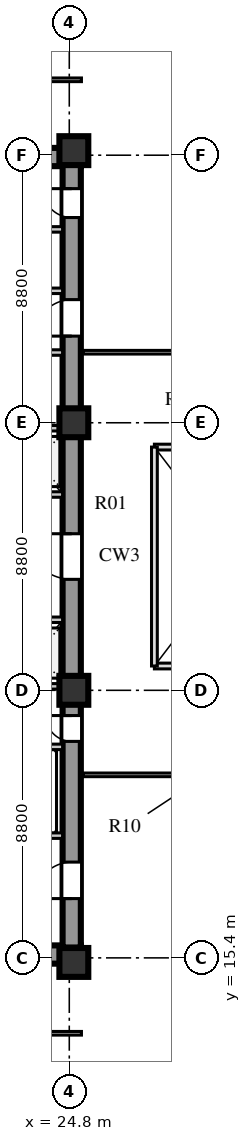
"""IFC4 building model, lengths in metres.
Left out: names, types, materials, properties, quantities, classifications, styles, units other than length and angle.
Written with IfcOpenShell. Run it as: python <this file> out.ifc"""

import sys

from ifc_helpers import new_model, si_unit, direction, frame, frame_2d, origin, origin_2d, place, context, subcontext, project, spatial, rectangle, extrude, element, fill, save


model = new_model("IFC4")
c1 = context("Model", 3, precision=1e-05, world=origin(), true_north=direction((0.0, 1.0)))
c2 = subcontext(c1, "Body", "Model", "MODEL_VIEW")
j1 = project(units=[si_unit("LENGTHUNIT", "METRE"), si_unit("PLANEANGLEUNIT", "RADIAN")], contexts=[c1])
p1 = place(None, origin())
s1 = spatial("IfcSite", under=j1, at=p1, CompositionType="ELEMENT")
p2 = place(p1, origin())
s2 = spatial("IfcBuilding", under=s1, at=p2, CompositionType="ELEMENT")
p3 = place(p2, frame((0.0, 0.0, 26.0)))
s3 = spatial("IfcBuildingStorey", under=s2, at=p3, CompositionType="ELEMENT", Elevation=26.0)
for number, where, z_axis, x_axis in (
    (1, (15.3, 15.51, 0.0), (0.0, 0.0, 1.0), (1.0, 0.0, 0.0)),
    (2, (15.3, 41.74, 0.0), (0.0, 0.0, 1.0), (1.0, 0.0, 0.0)),
):
    element("IfcWall", number, at=place(p3, frame(where, z_axis=z_axis, x_axis=x_axis)), inside=s3, PredefinedType="SHEAR", context=c2, shape_type="SweptSolid", body=[
        extrude(rectangle(XDim=9.88, YDim=0.6, at=frame_2d((4.94, 0.0))), origin(), (0.0, 0.0, 1.0), 3.72),
    ])
p4 = place(p3, frame((24.88, 15.74, 0.0), z_axis=(0.0, 0.0, 1.0), x_axis=(0.0, 1.0, 0.0)))
e3 = element("IfcWall", 3, at=p4, inside=s3, PredefinedType="SHEAR", context=c2, shape_type="SweptSolid", body=[
    extrude(rectangle(XDim=25.76, YDim=0.6, at=frame_2d((12.88, 0.0))), origin(), (0.0, 0.0, 1.0), 3.72),
])
p5 = place(p4, frame((1.61, 0.0, 0.0)))
e4 = element("IfcOpeningElement", 4, at=p5, cuts=e3, PredefinedType="OPENING", context=c2, shape_type="SweptSolid", body=[
    extrude(rectangle(XDim=1.2, YDim=2.1, at=frame_2d((0.6, 1.05))), frame((0.0, 0.31, 0.0), z_axis=(0.0, -1.0, 0.0), x_axis=(1.0, 0.0, 0.0)), (0.0, 0.0, 1.0), 0.62),
])
p6 = place(p4, frame((6.78, 0.0, 0.0)))
e5 = element("IfcOpeningElement", 5, at=p6, cuts=e3, PredefinedType="OPENING", context=c2, shape_type="SweptSolid", body=[
    extrude(rectangle(XDim=0.85, YDim=2.06, at=frame_2d((0.425, 1.03))), frame((0.0, 0.31, 0.0), z_axis=(0.0, -1.0, 0.0), x_axis=(1.0, 0.0, 0.0)), (0.0, 0.0, 1.0), 0.62),
])
p7 = place(p4, frame((12.11, 0.0, 0.0)))
e6 = element("IfcOpeningElement", 6, at=p7, cuts=e3, PredefinedType="OPENING", context=c2, shape_type="SweptSolid", body=[
    extrude(rectangle(XDim=1.5, YDim=2.12, at=frame_2d((0.75, 1.06))), frame((0.0, 0.31, 0.0), z_axis=(0.0, -1.0, 0.0), x_axis=(1.0, 0.0, 0.0)), (0.0, 0.0, 1.0), 0.62),
])
p8 = place(p4, frame((20.11, 0.0, 0.0)))
e7 = element("IfcOpeningElement", 7, at=p8, cuts=e3, PredefinedType="OPENING", context=c2, shape_type="SweptSolid", body=[
    extrude(rectangle(XDim=1.2, YDim=2.12, at=frame_2d((0.6, 1.06))), frame((0.0, 0.31, 0.0), z_axis=(0.0, -1.0, 0.0), x_axis=(1.0, 0.0, 0.0)), (0.0, 0.0, 1.0), 0.62),
])
p9 = place(p4, frame((24.01, 0.0, 0.0)))
e8 = element("IfcOpeningElement", 8, at=p9, cuts=e3, PredefinedType="OPENING", context=c2, shape_type="SweptSolid", body=[
    extrude(rectangle(XDim=0.95, YDim=2.1, at=frame_2d((0.475, 1.05))), frame((0.0, 0.31, 0.0), z_axis=(0.0, -1.0, 0.0), x_axis=(1.0, 0.0, 0.0)), (0.0, 0.0, 1.0), 0.62),
])
for number, where, z_axis, x_axis in (
    (9, (24.95, 15.25, 0.0), (0.0, 0.0, 1.0), (1.0, 0.0, 0.0)),
    (10, (24.95, 24.2, 0.0), (0.0, 0.0, 1.0), (1.0, 0.0, 0.0)),
    (11, (24.95, 33.0, 0.0), (0.0, 0.0, 1.0), (1.0, 0.0, 0.0)),
    (12, (24.95, 41.95, 0.0), (0.0, 0.0, 1.0), (1.0, 0.0, 0.0)),
):
    element("IfcColumn", number, at=place(p3, frame(where, z_axis=z_axis, x_axis=x_axis)), inside=s3, PredefinedType="COLUMN", context=c2, shape_type="SweptSolid", body=[
        extrude(rectangle(XDim=0.95, YDim=0.95, at=origin_2d()), origin(), (0.0, 0.0, 1.0), 3.72),
    ])
p10 = place(p3, frame((19.64, 19.42, 0.0), z_axis=(0.0, 0.0, 1.0), x_axis=(1.0, 0.0, 0.0)))
e13 = element("IfcWall", 13, at=p10, inside=s3, PredefinedType="SOLIDWALL", context=c2, shape_type="SweptSolid", body=[
    extrude(rectangle(XDim=4.94, YDim=0.18, at=frame_2d((2.47, 0.0))), origin(), (0.0, 0.0, 1.0), 3.72),
])
p11 = place(p10, frame((0.72, 0.0, 0.0)))
e14 = element("IfcOpeningElement", 14, at=p11, cuts=e13, PredefinedType="OPENING", context=c2, shape_type="SweptSolid", body=[
    extrude(rectangle(XDim=1.1, YDim=2.1, at=frame_2d((0.55, 1.05))), frame((0.0, 0.1, 0.0), z_axis=(0.0, -1.0, 0.0), x_axis=(1.0, 0.0, 0.0)), (0.0, 0.0, 1.0), 0.2),
])
p12 = place(p10, frame((3.02, 0.0, 0.0)))
e15 = element("IfcOpeningElement", 15, at=p12, cuts=e13, PredefinedType="OPENING", context=c2, shape_type="SweptSolid", body=[
    extrude(rectangle(XDim=1.1, YDim=2.1, at=frame_2d((0.55, 1.05))), frame((0.0, 0.1, 0.0), z_axis=(0.0, -1.0, 0.0), x_axis=(1.0, 0.0, 0.0)), (0.0, 0.0, 1.0), 0.2),
])
p13 = place(p3, frame((19.64, 22.34, 0.0), z_axis=(0.0, 0.0, 1.0), x_axis=(1.0, 0.0, 0.0)))
e16 = element("IfcWall", 16, at=p13, inside=s3, PredefinedType="SOLIDWALL", context=c2, shape_type="SweptSolid", body=[
    extrude(rectangle(XDim=4.94, YDim=0.18, at=frame_2d((2.47, 0.0))), origin(), (0.0, 0.0, 1.0), 3.72),
])
p14 = place(p3, frame((15.9, 26.52, 0.0), z_axis=(0.0, 0.0, 1.0), x_axis=(1.0, 0.0, 0.0)))
e17 = element("IfcWall", 17, at=p14, inside=s3, PredefinedType="SOLIDWALL", context=c2, shape_type="SweptSolid", body=[
    extrude(rectangle(XDim=8.68, YDim=0.18, at=frame_2d((4.34, 0.0))), origin(), (0.0, 0.0, 1.0), 3.72),
])
p15 = place(p14, frame((1.76, 0.0, 0.0)))
e18 = element("IfcOpeningElement", 18, at=p15, cuts=e17, PredefinedType="OPENING", context=c2, shape_type="SweptSolid", body=[
    extrude(rectangle(XDim=1.0, YDim=2.1, at=frame_2d((0.5, 1.05))), frame((0.0, 0.1, 0.0), z_axis=(0.0, -1.0, 0.0), x_axis=(1.0, 0.0, 0.0)), (0.0, 0.0, 1.0), 0.2),
])
p16 = place(p14, frame((3.6, 0.0, 0.0)))
e19 = element("IfcOpeningElement", 19, at=p16, cuts=e17, PredefinedType="OPENING", context=c2, shape_type="SweptSolid", body=[
    extrude(rectangle(XDim=1.0, YDim=2.1, at=frame_2d((0.5, 1.05))), frame((0.0, 0.1, 0.0), z_axis=(0.0, -1.0, 0.0), x_axis=(1.0, 0.0, 0.0)), (0.0, 0.0, 1.0), 0.2),
])
p17 = place(p14, frame((5.44, 0.0, 0.0)))
e20 = element("IfcOpeningElement", 20, at=p17, cuts=e17, PredefinedType="OPENING", context=c2, shape_type="SweptSolid", body=[
    extrude(rectangle(XDim=1.0, YDim=2.1, at=frame_2d((0.5, 1.05))), frame((0.0, 0.1, 0.0), z_axis=(0.0, -1.0, 0.0), x_axis=(1.0, 0.0, 0.0)), (0.0, 0.0, 1.0), 0.2),
])
p18 = place(p14, frame((7.28, 0.0, 0.0)))
e21 = element("IfcOpeningElement", 21, at=p18, cuts=e17, PredefinedType="OPENING", context=c2, shape_type="SweptSolid", body=[
    extrude(rectangle(XDim=1.0, YDim=2.1, at=frame_2d((0.5, 1.05))), frame((0.0, 0.1, 0.0), z_axis=(0.0, -1.0, 0.0), x_axis=(1.0, 0.0, 0.0)), (0.0, 0.0, 1.0), 0.2),
])
p19 = place(p3, frame((15.9, 24.33, 0.0), z_axis=(0.0, 0.0, 1.0), x_axis=(1.0, 0.0, 0.0)))
e22 = element("IfcWall", 22, at=p19, inside=s3, PredefinedType="SOLIDWALL", context=c2, shape_type="SweptSolid", body=[
    extrude(rectangle(XDim=8.68, YDim=0.18, at=frame_2d((4.34, 0.0))), origin(), (0.0, 0.0, 1.0), 3.02),
])
p20 = place(p3, frame((15.9, 30.64, 0.0), z_axis=(0.0, 0.0, 1.0), x_axis=(1.0, 0.0, 0.0)))
e23 = element("IfcWall", 23, at=p20, inside=s3, PredefinedType="SOLIDWALL", context=c2, shape_type="SweptSolid", body=[
    extrude(rectangle(XDim=8.68, YDim=0.18, at=frame_2d((4.34, 0.0))), origin(), (0.0, 0.0, 1.0), 3.72),
])
p21 = place(p20, frame((1.76, 0.0, 0.0)))
e24 = element("IfcOpeningElement", 24, at=p21, cuts=e23, PredefinedType="OPENING", context=c2, shape_type="SweptSolid", body=[
    extrude(rectangle(XDim=1.0, YDim=2.1, at=frame_2d((0.5, 1.05))), frame((0.0, 0.1, 0.0), z_axis=(0.0, -1.0, 0.0), x_axis=(1.0, 0.0, 0.0)), (0.0, 0.0, 1.0), 0.2),
])
p22 = place(p20, frame((3.6, 0.0, 0.0)))
e25 = element("IfcOpeningElement", 25, at=p22, cuts=e23, PredefinedType="OPENING", context=c2, shape_type="SweptSolid", body=[
    extrude(rectangle(XDim=1.0, YDim=2.1, at=frame_2d((0.5, 1.05))), frame((0.0, 0.1, 0.0), z_axis=(0.0, -1.0, 0.0), x_axis=(1.0, 0.0, 0.0)), (0.0, 0.0, 1.0), 0.2),
])
p23 = place(p20, frame((5.44, 0.0, 0.0)))
e26 = element("IfcOpeningElement", 26, at=p23, cuts=e23, PredefinedType="OPENING", context=c2, shape_type="SweptSolid", body=[
    extrude(rectangle(XDim=1.0, YDim=2.1, at=frame_2d((0.5, 1.05))), frame((0.0, 0.1, 0.0), z_axis=(0.0, -1.0, 0.0), x_axis=(1.0, 0.0, 0.0)), (0.0, 0.0, 1.0), 0.2),
])
p24 = place(p20, frame((7.28, 0.0, 0.0)))
e27 = element("IfcOpeningElement", 27, at=p24, cuts=e23, PredefinedType="OPENING", context=c2, shape_type="SweptSolid", body=[
    extrude(rectangle(XDim=1.0, YDim=2.1, at=frame_2d((0.5, 1.05))), frame((0.0, 0.1, 0.0), z_axis=(0.0, -1.0, 0.0), x_axis=(1.0, 0.0, 0.0)), (0.0, 0.0, 1.0), 0.2),
])
p25 = place(p3, frame((15.9, 32.82, 0.0), z_axis=(0.0, 0.0, 1.0), x_axis=(1.0, 0.0, 0.0)))
e28 = element("IfcWall", 28, at=p25, inside=s3, PredefinedType="SOLIDWALL", context=c2, shape_type="SweptSolid", body=[
    extrude(rectangle(XDim=8.68, YDim=0.18, at=frame_2d((4.34, 0.0))), origin(), (0.0, 0.0, 1.0), 3.02),
])
p26 = place(p3, frame((22.02, 35.31, 0.0), z_axis=(0.0, 0.0, 1.0), x_axis=(1.0, 0.0, 0.0)))
e29 = element("IfcWall", 29, at=p26, inside=s3, PredefinedType="SOLIDWALL", context=c2, shape_type="SweptSolid", body=[
    extrude(rectangle(XDim=2.56, YDim=0.18, at=frame_2d((1.28, 0.0))), origin(), (0.0, 0.0, 1.0), 3.72),
])
p27 = place(p26, frame((0.55, 0.0, 0.0)))
e30 = element("IfcOpeningElement", 30, at=p27, cuts=e29, PredefinedType="OPENING", context=c2, shape_type="SweptSolid", body=[
    extrude(rectangle(XDim=1.0, YDim=2.1, at=frame_2d((0.5, 1.05))), frame((0.0, 0.1, 0.0), z_axis=(0.0, -1.0, 0.0), x_axis=(1.0, 0.0, 0.0)), (0.0, 0.0, 1.0), 0.2),
])
p28 = place(p3, frame((19.64, 37.34, 0.0), z_axis=(0.0, 0.0, 1.0), x_axis=(1.0, 0.0, 0.0)))
e31 = element("IfcWall", 31, at=p28, inside=s3, PredefinedType="SOLIDWALL", context=c2, shape_type="SweptSolid", body=[
    extrude(rectangle(XDim=4.94, YDim=0.18, at=frame_2d((2.47, 0.0))), origin(), (0.0, 0.0, 1.0), 3.72),
])
p29 = place(p28, frame((0.45, 0.0, 0.0)))
e32 = element("IfcOpeningElement", 32, at=p29, cuts=e31, PredefinedType="OPENING", context=c2, shape_type="SweptSolid", body=[
    extrude(rectangle(XDim=1.0, YDim=2.1, at=frame_2d((0.5, 1.05))), frame((0.0, 0.1, 0.0), z_axis=(0.0, -1.0, 0.0), x_axis=(1.0, 0.0, 0.0)), (0.0, 0.0, 1.0), 0.2),
])
p30 = place(p28, frame((2.5, 0.0, 0.0)))
e33 = element("IfcOpeningElement", 33, at=p30, cuts=e31, PredefinedType="OPENING", context=c2, shape_type="SweptSolid", body=[
    extrude(rectangle(XDim=1.0, YDim=2.1, at=frame_2d((0.5, 1.05))), frame((0.0, 0.1, 0.0), z_axis=(0.0, -1.0, 0.0), x_axis=(1.0, 0.0, 0.0)), (0.0, 0.0, 1.0), 0.2),
])
p31 = place(p3, frame((19.64, 39.36, 0.0), z_axis=(0.0, 0.0, 1.0), x_axis=(1.0, 0.0, 0.0)))
e34 = element("IfcWall", 34, at=p31, inside=s3, PredefinedType="SOLIDWALL", context=c2, shape_type="SweptSolid", body=[
    extrude(rectangle(XDim=4.94, YDim=0.18, at=frame_2d((2.47, 0.0))), origin(), (0.0, 0.0, 1.0), 3.72),
])
p32 = place(p3, frame((25.25, 21.42, 0.0), z_axis=(0.0, 0.0, 1.0), x_axis=(1.0, 0.0, 0.0)))
e35 = element("IfcWall", 35, at=p32, inside=s3, PredefinedType="PARTITIONING", context=c2, shape_type="SweptSolid", body=[
    extrude(rectangle(XDim=12.87, YDim=0.12, at=frame_2d((6.435, 0.0))), origin(), (0.0, 0.0, 1.0), 3.32),
])
p33 = place(p32, frame((5.945, 0.0, 0.0)))
e36 = element("IfcOpeningElement", 36, at=p33, cuts=e35, PredefinedType="OPENING", context=c2, shape_type="SweptSolid", body=[
    extrude(rectangle(XDim=0.95, YDim=2.08, at=frame_2d((0.475, 1.04))), frame((0.0, 0.07, 0.0), z_axis=(0.0, -1.0, 0.0), x_axis=(1.0, 0.0, 0.0)), (0.0, 0.0, 1.0), 0.14),
])
p34 = place(p3, frame((25.25, 35.32, 0.0), z_axis=(0.0, 0.0, 1.0), x_axis=(1.0, 0.0, 0.0)))
e37 = element("IfcWall", 37, at=p34, inside=s3, PredefinedType="PARTITIONING", context=c2, shape_type="SweptSolid", body=[
    extrude(rectangle(XDim=9.47, YDim=0.12, at=frame_2d((4.735, 0.0))), origin(), (0.0, 0.0, 1.0), 3.72),
])
p35 = place(p34, frame((4.265, 0.0, 0.0)))
e38 = element("IfcOpeningElement", 38, at=p35, cuts=e37, PredefinedType="OPENING", context=c2, shape_type="SweptSolid", body=[
    extrude(rectangle(XDim=0.95, YDim=2.08, at=frame_2d((0.475, 1.04))), frame((0.0, 0.07, 0.0), z_axis=(0.0, -1.0, 0.0), x_axis=(1.0, 0.0, 0.0)), (0.0, 0.0, 1.0), 0.14),
])
p36 = place(p3, frame((10.5, 12.92, 0.0), z_axis=(0.0, 0.0, 1.0), x_axis=(1.0, 0.0, 0.0)))
e39 = element("IfcWall", 39, at=p36, inside=s3, PredefinedType="PARTITIONING", context=c2, shape_type="SweptSolid", body=[
    extrude(rectangle(XDim=14.7, YDim=0.12, at=frame_2d((7.35, 0.0))), origin(), (0.0, 0.0, 1.0), 3.72),
])
p37 = place(p36, frame((6.2, 0.0, 0.0)))
e40 = element("IfcOpeningElement", 40, at=p37, cuts=e39, PredefinedType="OPENING", context=c2, shape_type="SweptSolid", body=[
    extrude(rectangle(XDim=1.0, YDim=2.08, at=frame_2d((0.5, 1.04))), frame((0.0, 0.07, 0.0), z_axis=(0.0, -1.0, 0.0), x_axis=(1.0, 0.0, 0.0)), (0.0, 0.0, 1.0), 0.14),
])
p38 = place(p3, frame((10.5, 44.28, 0.0), z_axis=(0.0, 0.0, 1.0), x_axis=(1.0, 0.0, 0.0)))
e41 = element("IfcWall", 41, at=p38, inside=s3, PredefinedType="PARTITIONING", context=c2, shape_type="SweptSolid", body=[
    extrude(rectangle(XDim=14.7, YDim=0.12, at=frame_2d((7.35, 0.0))), origin(), (0.0, 0.0, 1.0), 3.72),
])
p39 = place(p38, frame((6.2, 0.0, 0.0)))
e42 = element("IfcOpeningElement", 42, at=p39, cuts=e41, PredefinedType="OPENING", context=c2, shape_type="SweptSolid", body=[
    extrude(rectangle(XDim=1.0, YDim=2.08, at=frame_2d((0.5, 1.04))), frame((0.0, 0.07, 0.0), z_axis=(0.0, -1.0, 0.0), x_axis=(1.0, 0.0, 0.0)), (0.0, 0.0, 1.0), 0.14),
])
p40 = place(p5, frame((1.2, 0.0, 0.0), z_axis=(0.0, 0.0, 1.0), x_axis=(-1.0, 0.0, 0.0)))
e43 = element("IfcDoor", 43, at=p40, inside=s3, OperationType="SINGLE_SWING_RIGHT", PredefinedType="DOOR", context=c2, shape_type="SweptSolid", body=[
    extrude(rectangle(XDim=1.2, YDim=2.1, at=frame_2d((0.6, 1.05))), frame((0.0, 0.025, 0.0), z_axis=(0.0, -1.0, 0.0), x_axis=(1.0, 0.0, 0.0)), (0.0, 0.0, 1.0), 0.05),
])
fill(e4, e43)
p41 = place(p6, frame((0.85, 0.0, 0.0), z_axis=(0.0, 0.0, 1.0), x_axis=(-1.0, 0.0, 0.0)))
e44 = element("IfcDoor", 44, at=p41, inside=s3, OperationType="SINGLE_SWING_LEFT", PredefinedType="DOOR", context=c2, shape_type="SweptSolid", body=[
    extrude(rectangle(XDim=0.85, YDim=2.06, at=frame_2d((0.425, 1.03))), frame((0.0, 0.025, 0.0), z_axis=(0.0, -1.0, 0.0), x_axis=(1.0, 0.0, 0.0)), (0.0, 0.0, 1.0), 0.05),
])
fill(e5, e44)
p42 = place(p7, frame((1.5, 0.0, 0.0), z_axis=(0.0, 0.0, 1.0), x_axis=(-1.0, 0.0, 0.0)))
e45 = element("IfcDoor", 45, at=p42, inside=s3, OperationType="SINGLE_SWING_LEFT", PredefinedType="DOOR", context=c2, shape_type="SweptSolid", body=[
    extrude(rectangle(XDim=1.5, YDim=2.12, at=frame_2d((0.75, 1.06))), frame((0.0, 0.025, 0.0), z_axis=(0.0, -1.0, 0.0), x_axis=(1.0, 0.0, 0.0)), (0.0, 0.0, 1.0), 0.05),
])
fill(e6, e45)
p43 = place(p8, frame((1.2, 0.0, 0.0), z_axis=(0.0, 0.0, 1.0), x_axis=(-1.0, 0.0, 0.0)))
e46 = element("IfcDoor", 46, at=p43, inside=s3, OperationType="SINGLE_SWING_RIGHT", PredefinedType="DOOR", context=c2, shape_type="SweptSolid", body=[
    extrude(rectangle(XDim=1.2, YDim=2.12, at=frame_2d((0.6, 1.06))), frame((0.0, 0.025, 0.0), z_axis=(0.0, -1.0, 0.0), x_axis=(1.0, 0.0, 0.0)), (0.0, 0.0, 1.0), 0.05),
])
fill(e7, e46)
p44 = place(p9, frame((0.95, 0.0, 0.0), z_axis=(0.0, 0.0, 1.0), x_axis=(-1.0, 0.0, 0.0)))
e47 = element("IfcDoor", 47, at=p44, inside=s3, OperationType="SINGLE_SWING_LEFT", PredefinedType="DOOR", context=c2, shape_type="SweptSolid", body=[
    extrude(rectangle(XDim=0.95, YDim=2.1, at=frame_2d((0.475, 1.05))), frame((0.0, 0.025, 0.0), z_axis=(0.0, -1.0, 0.0), x_axis=(1.0, 0.0, 0.0)), (0.0, 0.0, 1.0), 0.05),
])
fill(e8, e47)
save(model, sys.argv[1])
